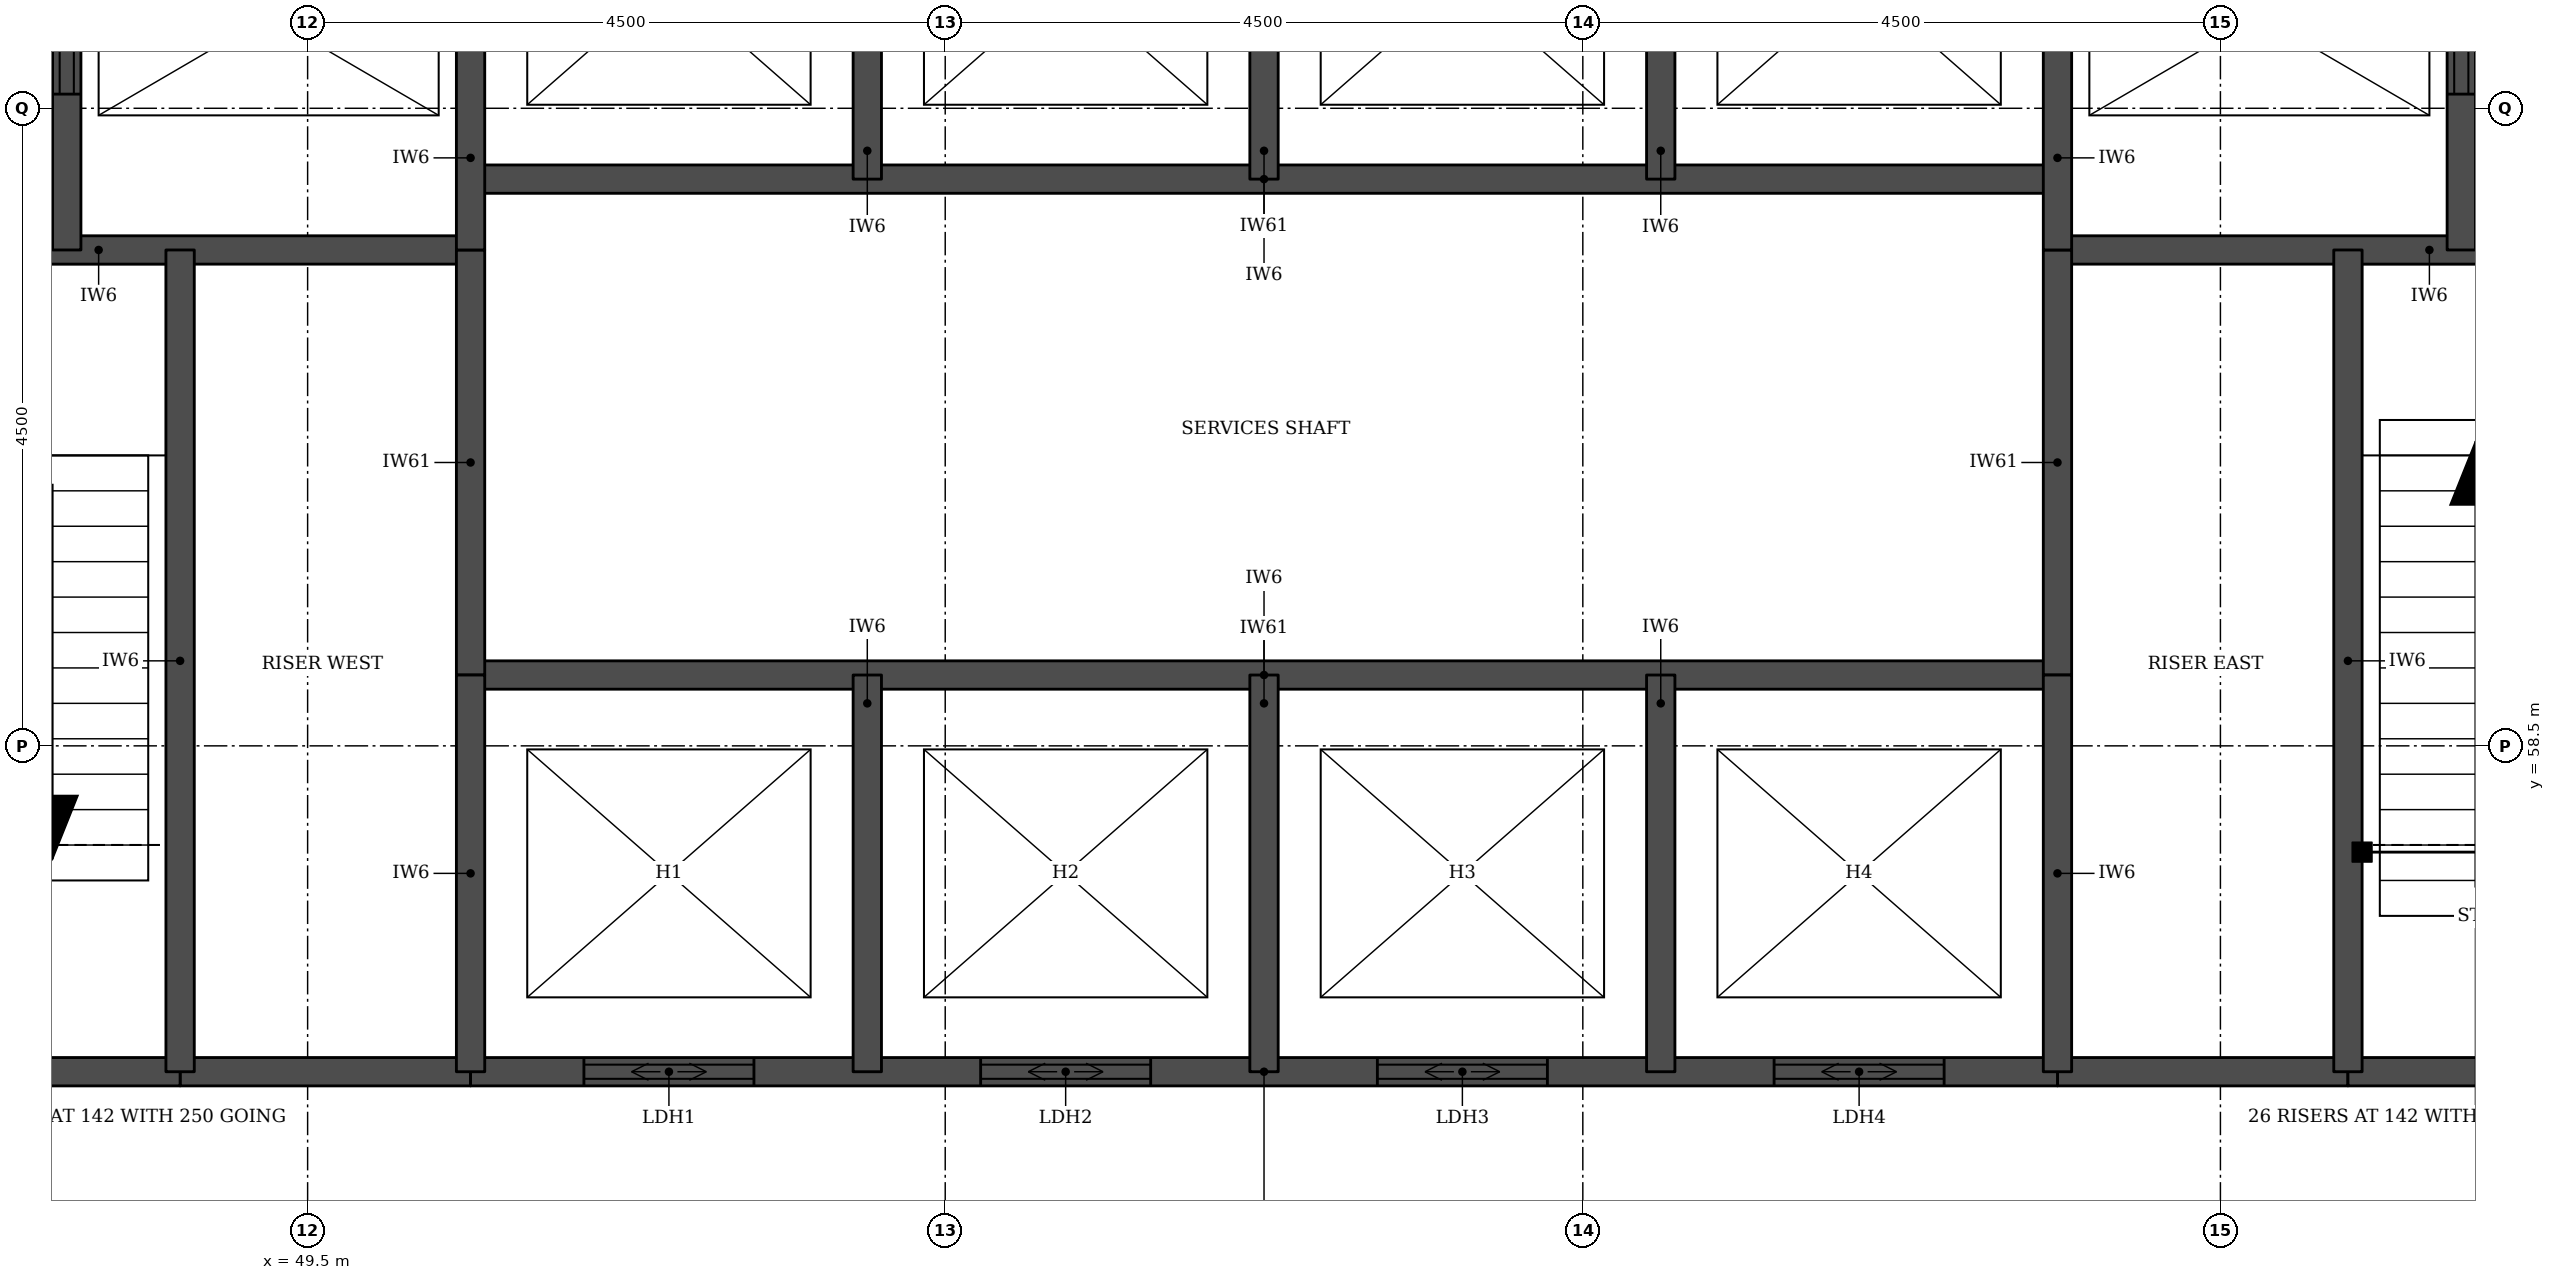
"""IFC4 building model, lengths in metres.
Left out: names, types, materials, properties, quantities, classifications, styles, units other than length and angle.
Written with IfcOpenShell. Run it as: python <this file> out.ifc"""

import sys

from ifc_helpers import new_model, si_unit, direction, frame, frame_2d, origin, place, context, subcontext, project, spatial, rectangle, extrude, element, fill, save


model = new_model("IFC4")
c1 = context("Model", 3, precision=1e-05, world=origin(), true_north=direction((0.0, 1.0)))
c2 = subcontext(c1, "Body", "Model", "MODEL_VIEW")
j1 = project(units=[si_unit("LENGTHUNIT", "METRE"), si_unit("PLANEANGLEUNIT", "RADIAN")], contexts=[c1])
p1 = place(None, origin())
s1 = spatial("IfcSite", under=j1, at=p1, CompositionType="ELEMENT")
p2 = place(p1, origin())
s2 = spatial("IfcBuilding", under=s1, at=p2, CompositionType="ELEMENT")
p3 = place(p2, frame((0.0, 0.0, 256.3)))
s3 = spatial("IfcBuildingStorey", under=s2, at=p3, CompositionType="ELEMENT", Elevation=256.3)
for number, where, z_axis, x_axis in (
    (1, (48.6, 56.2, 0.0), (0.0, 0.0, 1.0), (1.0, 0.0, 0.0)),
    (2, (61.85, 56.2, 0.0), (0.0, 0.0, 1.0), (1.0, 0.0, 0.0)),
):
    element("IfcWall", number, at=place(p3, frame(where, z_axis=z_axis, x_axis=x_axis)), inside=s3, PredefinedType="SOLIDWALL", context=c2, shape_type="SweptSolid", body=[
        extrude(rectangle(XDim=2.05, YDim=0.2, at=frame_2d((1.025, 0.0))), origin(), (0.0, 0.0, 1.0), 3.55),
    ])
p4 = place(p3, frame((45.4, 56.2, 0.0), z_axis=(0.0, 0.0, 1.0), x_axis=(1.0, 0.0, 0.0)))
e3 = element("IfcWall", 3, at=p4, inside=s3, PredefinedType="SOLIDWALL", context=c2, shape_type="SweptSolid", body=[
    extrude(rectangle(XDim=3.2, YDim=0.2, at=frame_2d((1.6, 0.0))), origin(), (0.0, 0.0, 1.0), 3.55),
])
p5 = place(p3, frame((50.65, 56.2, 0.0), z_axis=(0.0, 0.0, 1.0), x_axis=(1.0, 0.0, 0.0)))
e4 = element("IfcWall", 4, at=p5, inside=s3, PredefinedType="SOLIDWALL", context=c2, shape_type="SweptSolid", body=[
    extrude(rectangle(XDim=11.2, YDim=0.2, at=frame_2d((5.6, 0.0))), origin(), (0.0, 0.0, 1.0), 3.55),
])
p6 = place(p5, frame((0.8, 0.0, 0.0)))
e5 = element("IfcOpeningElement", 5, at=p6, cuts=e4, PredefinedType="OPENING", context=c2, shape_type="SweptSolid", body=[
    extrude(rectangle(XDim=1.2, YDim=2.1, at=frame_2d((0.6, 1.05))), frame((0.0, 0.11, 0.0), z_axis=(0.0, -1.0, 0.0), x_axis=(1.0, 0.0, 0.0)), (0.0, 0.0, 1.0), 0.22),
])
p7 = place(p5, frame((3.6, 0.0, 0.0)))
e6 = element("IfcOpeningElement", 6, at=p7, cuts=e4, PredefinedType="OPENING", context=c2, shape_type="SweptSolid", body=[
    extrude(rectangle(XDim=1.2, YDim=2.1, at=frame_2d((0.6, 1.05))), frame((0.0, 0.11, 0.0), z_axis=(0.0, -1.0, 0.0), x_axis=(1.0, 0.0, 0.0)), (0.0, 0.0, 1.0), 0.22),
])
p8 = place(p5, frame((6.4, 0.0, 0.0)))
e7 = element("IfcOpeningElement", 7, at=p8, cuts=e4, PredefinedType="OPENING", context=c2, shape_type="SweptSolid", body=[
    extrude(rectangle(XDim=1.2, YDim=2.1, at=frame_2d((0.6, 1.05))), frame((0.0, 0.11, 0.0), z_axis=(0.0, -1.0, 0.0), x_axis=(1.0, 0.0, 0.0)), (0.0, 0.0, 1.0), 0.22),
])
p9 = place(p5, frame((9.2, 0.0, 0.0)))
e8 = element("IfcOpeningElement", 8, at=p9, cuts=e4, PredefinedType="OPENING", context=c2, shape_type="SweptSolid", body=[
    extrude(rectangle(XDim=1.2, YDim=2.1, at=frame_2d((0.6, 1.05))), frame((0.0, 0.11, 0.0), z_axis=(0.0, -1.0, 0.0), x_axis=(1.0, 0.0, 0.0)), (0.0, 0.0, 1.0), 0.22),
])
p10 = place(p3, frame((63.9, 56.2, 0.0), z_axis=(0.0, 0.0, 1.0), x_axis=(1.0, 0.0, 0.0)))
e9 = element("IfcWall", 9, at=p10, inside=s3, PredefinedType="SOLIDWALL", context=c2, shape_type="SweptSolid", body=[
    extrude(rectangle(XDim=3.2, YDim=0.2, at=frame_2d((1.6, 0.0))), origin(), (0.0, 0.0, 1.0), 3.55),
])
p11 = place(p3, frame((50.65, 59.0, 0.0), z_axis=(0.0, 0.0, 1.0), x_axis=(1.0, 0.0, 0.0)))
e10 = element("IfcWall", 10, at=p11, inside=s3, PredefinedType="SOLIDWALL", context=c2, shape_type="SweptSolid", body=[
    extrude(rectangle(XDim=11.2, YDim=0.2, at=frame_2d((5.6, 0.0))), origin(), (0.0, 0.0, 1.0), 3.7),
])
for number, where, z_axis, x_axis in (
    (11, (45.4, 62.0, 0.0), (0.0, 0.0, 1.0), (1.0, 0.0, 0.0)),
    (12, (61.85, 62.0, 0.0), (0.0, 0.0, 1.0), (1.0, 0.0, 0.0)),
):
    element("IfcWall", number, at=place(p3, frame(where, z_axis=z_axis, x_axis=x_axis)), inside=s3, PredefinedType="SOLIDWALL", context=c2, shape_type="SweptSolid", body=[
        extrude(rectangle(XDim=5.25, YDim=0.2, at=frame_2d((2.625, 0.0))), origin(), (0.0, 0.0, 1.0), 3.55),
    ])
p12 = place(p3, frame((50.65, 62.5, 0.0), z_axis=(0.0, 0.0, 1.0), x_axis=(1.0, 0.0, 0.0)))
e13 = element("IfcWall", 13, at=p12, inside=s3, PredefinedType="SOLIDWALL", context=c2, shape_type="SweptSolid", body=[
    extrude(rectangle(XDim=11.2, YDim=0.2, at=frame_2d((5.6, 0.0))), origin(), (0.0, 0.0, 1.0), 3.7),
])
p13 = place(p3, frame((47.8, 62.0, 0.0), z_axis=(0.0, 0.0, 1.0), x_axis=(0.0, 1.0, 0.0)))
e14 = element("IfcWall", 14, at=p13, inside=s3, PredefinedType="SOLIDWALL", context=c2, shape_type="SweptSolid", body=[
    extrude(rectangle(XDim=3.3, YDim=0.2, at=frame_2d((1.65, 0.0))), origin(), (0.0, 0.0, 1.0), 3.55),
])
p14 = place(p13, frame((1.1, 0.0, 0.0)))
e15 = element("IfcOpeningElement", 15, at=p14, cuts=e14, PredefinedType="OPENING", context=c2, shape_type="SweptSolid", body=[
    extrude(rectangle(XDim=1.1, YDim=2.1, at=frame_2d((0.55, 1.05))), frame((0.0, 0.11, 0.0), z_axis=(0.0, -1.0, 0.0), x_axis=(1.0, 0.0, 0.0)), (0.0, 0.0, 1.0), 0.22),
])
p15 = place(p3, frame((48.6, 56.2, 0.0), z_axis=(0.0, 0.0, 1.0), x_axis=(0.0, 1.0, 0.0)))
e16 = element("IfcWall", 16, at=p15, inside=s3, PredefinedType="SOLIDWALL", context=c2, shape_type="SweptSolid", body=[
    extrude(rectangle(XDim=5.8, YDim=0.2, at=frame_2d((2.9, 0.0))), origin(), (0.0, 0.0, 1.0), 3.55),
])
p16 = place(p3, frame((50.65, 59.0, 0.0), z_axis=(0.0, 0.0, 1.0), x_axis=(0.0, 1.0, 0.0)))
e17 = element("IfcWall", 17, at=p16, inside=s3, PredefinedType="SOLIDWALL", context=c2, shape_type="SweptSolid", body=[
    extrude(rectangle(XDim=3.0, YDim=0.2, at=frame_2d((1.5, 0.0))), origin(), (0.0, 0.0, 1.0), 3.7),
])
p17 = place(p3, frame((50.65, 56.2, 0.0), z_axis=(0.0, 0.0, 1.0), x_axis=(0.0, 1.0, 0.0)))
e18 = element("IfcWall", 18, at=p17, inside=s3, PredefinedType="SOLIDWALL", context=c2, shape_type="SweptSolid", body=[
    extrude(rectangle(XDim=2.8, YDim=0.2, at=frame_2d((1.4, 0.0))), origin(), (0.0, 0.0, 1.0), 3.55),
])
p18 = place(p3, frame((50.65, 62.0, 0.0), z_axis=(0.0, 0.0, 1.0), x_axis=(0.0, 1.0, 0.0)))
e19 = element("IfcWall", 19, at=p18, inside=s3, PredefinedType="SOLIDWALL", context=c2, shape_type="SweptSolid", body=[
    extrude(rectangle(XDim=3.3, YDim=0.2, at=frame_2d((1.65, 0.0))), origin(), (0.0, 0.0, 1.0), 3.55),
])
for number, where, z_axis, x_axis in (
    (20, (53.45, 56.2, 0.0), (0.0, 0.0, 1.0), (0.0, 1.0, 0.0)),
    (21, (53.45, 62.5, 0.0), (0.0, 0.0, 1.0), (0.0, 1.0, 0.0)),
    (22, (56.25, 56.2, 0.0), (0.0, 0.0, 1.0), (0.0, 1.0, 0.0)),
    (23, (56.25, 62.5, 0.0), (0.0, 0.0, 1.0), (0.0, 1.0, 0.0)),
    (24, (59.05, 56.2, 0.0), (0.0, 0.0, 1.0), (0.0, 1.0, 0.0)),
    (25, (59.05, 62.5, 0.0), (0.0, 0.0, 1.0), (0.0, 1.0, 0.0)),
):
    element("IfcWall", number, at=place(p3, frame(where, z_axis=z_axis, x_axis=x_axis)), inside=s3, PredefinedType="SOLIDWALL", context=c2, shape_type="SweptSolid", body=[
        extrude(rectangle(XDim=2.8, YDim=0.2, at=frame_2d((1.4, 0.0))), origin(), (0.0, 0.0, 1.0), 3.55),
    ])
p19 = place(p3, frame((61.85, 59.0, 0.0), z_axis=(0.0, 0.0, 1.0), x_axis=(0.0, 1.0, 0.0)))
e26 = element("IfcWall", 26, at=p19, inside=s3, PredefinedType="SOLIDWALL", context=c2, shape_type="SweptSolid", body=[
    extrude(rectangle(XDim=3.0, YDim=0.2, at=frame_2d((1.5, 0.0))), origin(), (0.0, 0.0, 1.0), 3.7),
])
p20 = place(p3, frame((61.85, 56.2, 0.0), z_axis=(0.0, 0.0, 1.0), x_axis=(0.0, 1.0, 0.0)))
e27 = element("IfcWall", 27, at=p20, inside=s3, PredefinedType="SOLIDWALL", context=c2, shape_type="SweptSolid", body=[
    extrude(rectangle(XDim=2.8, YDim=0.2, at=frame_2d((1.4, 0.0))), origin(), (0.0, 0.0, 1.0), 3.55),
])
p21 = place(p3, frame((61.85, 62.0, 0.0), z_axis=(0.0, 0.0, 1.0), x_axis=(0.0, 1.0, 0.0)))
e28 = element("IfcWall", 28, at=p21, inside=s3, PredefinedType="SOLIDWALL", context=c2, shape_type="SweptSolid", body=[
    extrude(rectangle(XDim=3.3, YDim=0.2, at=frame_2d((1.65, 0.0))), origin(), (0.0, 0.0, 1.0), 3.55),
])
p22 = place(p3, frame((63.9, 56.2, 0.0), z_axis=(0.0, 0.0, 1.0), x_axis=(0.0, 1.0, 0.0)))
e29 = element("IfcWall", 29, at=p22, inside=s3, PredefinedType="SOLIDWALL", context=c2, shape_type="SweptSolid", body=[
    extrude(rectangle(XDim=5.8, YDim=0.2, at=frame_2d((2.9, 0.0))), origin(), (0.0, 0.0, 1.0), 3.55),
])
p23 = place(p3, frame((64.7, 62.0, 0.0), z_axis=(0.0, 0.0, 1.0), x_axis=(0.0, 1.0, 0.0)))
e30 = element("IfcWall", 30, at=p23, inside=s3, PredefinedType="SOLIDWALL", context=c2, shape_type="SweptSolid", body=[
    extrude(rectangle(XDim=3.3, YDim=0.2, at=frame_2d((1.65, 0.0))), origin(), (0.0, 0.0, 1.0), 3.55),
])
p24 = place(p23, frame((1.1, 0.0, 0.0)))
e31 = element("IfcOpeningElement", 31, at=p24, cuts=e30, PredefinedType="OPENING", context=c2, shape_type="SweptSolid", body=[
    extrude(rectangle(XDim=1.1, YDim=2.1, at=frame_2d((0.55, 1.05))), frame((0.0, 0.11, 0.0), z_axis=(0.0, -1.0, 0.0), x_axis=(1.0, 0.0, 0.0)), (0.0, 0.0, 1.0), 0.22),
])
p25 = place(p6, origin())
e32 = element("IfcDoor", 32, at=p25, inside=s3, OperationType="DOUBLE_DOOR_SLIDING", PredefinedType="DOOR", context=c2, shape_type="SweptSolid", body=[
    extrude(rectangle(XDim=1.2, YDim=2.1, at=frame_2d((0.6, 1.05))), frame((0.0, 0.025, 0.0), z_axis=(0.0, -1.0, 0.0), x_axis=(1.0, 0.0, 0.0)), (0.0, 0.0, 1.0), 0.05),
])
fill(e5, e32)
p26 = place(p7, origin())
e33 = element("IfcDoor", 33, at=p26, inside=s3, OperationType="DOUBLE_DOOR_SLIDING", PredefinedType="DOOR", context=c2, shape_type="SweptSolid", body=[
    extrude(rectangle(XDim=1.2, YDim=2.1, at=frame_2d((0.6, 1.05))), frame((0.0, 0.025, 0.0), z_axis=(0.0, -1.0, 0.0), x_axis=(1.0, 0.0, 0.0)), (0.0, 0.0, 1.0), 0.05),
])
fill(e6, e33)
p27 = place(p8, origin())
e34 = element("IfcDoor", 34, at=p27, inside=s3, OperationType="DOUBLE_DOOR_SLIDING", PredefinedType="DOOR", context=c2, shape_type="SweptSolid", body=[
    extrude(rectangle(XDim=1.2, YDim=2.1, at=frame_2d((0.6, 1.05))), frame((0.0, 0.025, 0.0), z_axis=(0.0, -1.0, 0.0), x_axis=(1.0, 0.0, 0.0)), (0.0, 0.0, 1.0), 0.05),
])
fill(e7, e34)
p28 = place(p9, origin())
e35 = element("IfcDoor", 35, at=p28, inside=s3, OperationType="DOUBLE_DOOR_SLIDING", PredefinedType="DOOR", context=c2, shape_type="SweptSolid", body=[
    extrude(rectangle(XDim=1.2, YDim=2.1, at=frame_2d((0.6, 1.05))), frame((0.0, 0.025, 0.0), z_axis=(0.0, -1.0, 0.0), x_axis=(1.0, 0.0, 0.0)), (0.0, 0.0, 1.0), 0.05),
])
fill(e8, e35)
p29 = place(p14, origin())
e36 = element("IfcDoor", 36, at=p29, inside=s3, OperationType="DOUBLE_DOOR_SLIDING", PredefinedType="DOOR", context=c2, shape_type="SweptSolid", body=[
    extrude(rectangle(XDim=1.1, YDim=2.1, at=frame_2d((0.55, 1.05))), frame((0.0, 0.025, 0.0), z_axis=(0.0, -1.0, 0.0), x_axis=(1.0, 0.0, 0.0)), (0.0, 0.0, 1.0), 0.05),
])
fill(e15, e36)
p30 = place(p24, origin())
e37 = element("IfcDoor", 37, at=p30, inside=s3, OperationType="DOUBLE_DOOR_SLIDING", PredefinedType="DOOR", context=c2, shape_type="SweptSolid", body=[
    extrude(rectangle(XDim=1.1, YDim=2.1, at=frame_2d((0.55, 1.05))), frame((0.0, 0.025, 0.0), z_axis=(0.0, -1.0, 0.0), x_axis=(1.0, 0.0, 0.0)), (0.0, 0.0, 1.0), 0.05),
])
fill(e31, e37)
save(model, sys.argv[1])
